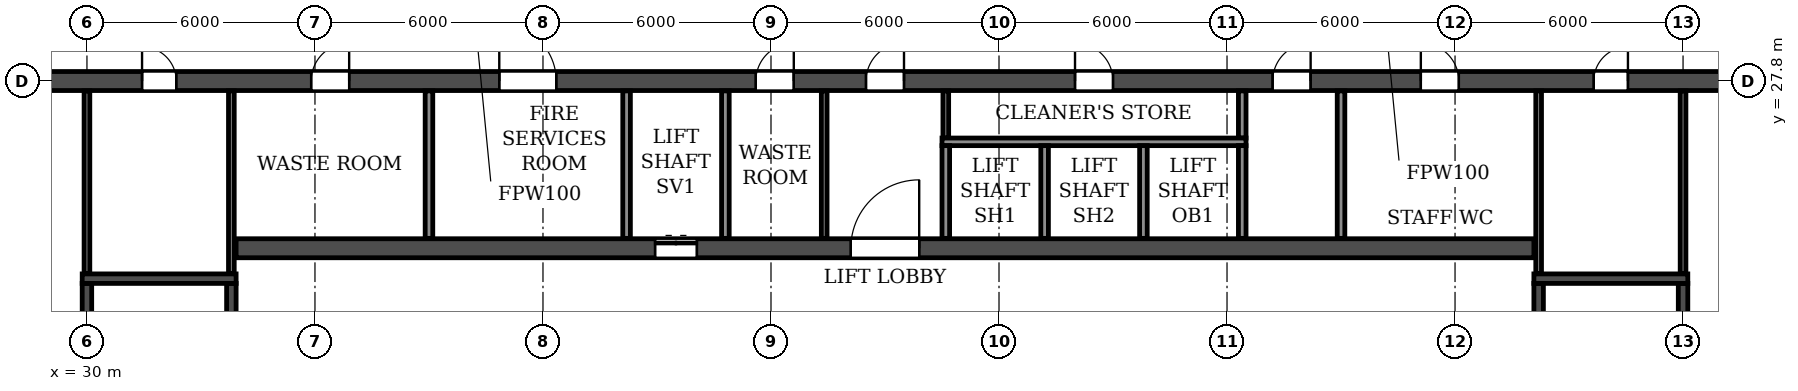
"""IFC4 building model, lengths in metres.
Left out: names, types, materials, properties, quantities, classifications, styles, units other than length and angle.
Written with IfcOpenShell. Run it as: python <this file> out.ifc"""

import sys

from ifc_helpers import new_model, si_unit, direction, frame, frame_2d, origin, place, context, subcontext, project, spatial, rectangle, extrude, element, fill, save


model = new_model("IFC4")
c1 = context("Model", 3, precision=1e-05, world=origin(), true_north=direction((0.0, 1.0)))
c2 = subcontext(c1, "Body", "Model", "MODEL_VIEW")
j1 = project(units=[si_unit("LENGTHUNIT", "METRE"), si_unit("PLANEANGLEUNIT", "RADIAN")], contexts=[c1])
p1 = place(None, origin())
s1 = spatial("IfcSite", under=j1, at=p1, CompositionType="ELEMENT")
p2 = place(p1, origin())
s2 = spatial("IfcBuilding", under=s1, at=p2, CompositionType="ELEMENT")
p3 = place(p2, frame((0.0, 0.0, 82.8)))
s3 = spatial("IfcBuildingStorey", under=s2, at=p3, CompositionType="ELEMENT", Elevation=82.8)
p4 = place(p3, frame((8.6, 27.8, 0.0), z_axis=(0.0, 0.0, 1.0), x_axis=(1.0, 0.0, 0.0)))
e1 = element("IfcWall", 1, at=p4, inside=s3, PredefinedType="SOLIDWALL", context=c2, shape_type="SweptSolid", body=[
    extrude(rectangle(XDim=84.8, YDim=0.5, at=frame_2d((42.4, 0.0))), origin(), (0.0, 0.0, 1.0), 3.06),
])
p5 = place(p4, frame((2.55, 0.0, 0.0)))
e2 = element("IfcOpeningElement", 2, at=p5, cuts=e1, PredefinedType="OPENING", context=c2, shape_type="SweptSolid", body=[
    extrude(rectangle(XDim=1.0, YDim=2.1, at=frame_2d((0.5, 1.05))), frame((0.0, 0.26, 0.0), z_axis=(0.0, -1.0, 0.0), x_axis=(1.0, 0.0, 0.0)), (0.0, 0.0, 1.0), 0.52),
])
p6 = place(p4, frame((7.25, 0.0, 0.0)))
e3 = element("IfcOpeningElement", 3, at=p6, cuts=e1, PredefinedType="OPENING", context=c2, shape_type="SweptSolid", body=[
    extrude(rectangle(XDim=1.0, YDim=2.1, at=frame_2d((0.5, 1.05))), frame((0.0, 0.26, 0.0), z_axis=(0.0, -1.0, 0.0), x_axis=(1.0, 0.0, 0.0)), (0.0, 0.0, 1.0), 0.52),
])
p7 = place(p4, frame((10.3, 0.0, 0.0)))
e4 = element("IfcOpeningElement", 4, at=p7, cuts=e1, PredefinedType="OPENING", context=c2, shape_type="SweptSolid", body=[
    extrude(rectangle(XDim=1.0, YDim=2.1, at=frame_2d((0.5, 1.05))), frame((0.0, 0.26, 0.0), z_axis=(0.0, -1.0, 0.0), x_axis=(1.0, 0.0, 0.0)), (0.0, 0.0, 1.0), 0.52),
])
p8 = place(p4, frame((13.65, 0.0, 0.0)))
e5 = element("IfcOpeningElement", 5, at=p8, cuts=e1, PredefinedType="OPENING", context=c2, shape_type="SweptSolid", body=[
    extrude(rectangle(XDim=0.9, YDim=2.1, at=frame_2d((0.45, 1.05))), frame((0.0, 0.26, 0.0), z_axis=(0.0, -1.0, 0.0), x_axis=(1.0, 0.0, 0.0)), (0.0, 0.0, 1.0), 0.52),
])
p9 = place(p4, frame((22.85, 0.0, 0.0)))
e6 = element("IfcOpeningElement", 6, at=p9, cuts=e1, PredefinedType="OPENING", context=c2, shape_type="SweptSolid", body=[
    extrude(rectangle(XDim=0.9, YDim=2.1, at=frame_2d((0.45, 1.05))), frame((0.0, 0.26, 0.0), z_axis=(0.0, -1.0, 0.0), x_axis=(1.0, 0.0, 0.0)), (0.0, 0.0, 1.0), 0.52),
])
p10 = place(p4, frame((27.3, 0.0, 0.0)))
e7 = element("IfcOpeningElement", 7, at=p10, cuts=e1, PredefinedType="OPENING", context=c2, shape_type="SweptSolid", body=[
    extrude(rectangle(XDim=1.0, YDim=2.1, at=frame_2d((0.5, 1.05))), frame((0.0, 0.26, 0.0), z_axis=(0.0, -1.0, 0.0), x_axis=(1.0, 0.0, 0.0)), (0.0, 0.0, 1.0), 0.52),
])
p11 = place(p4, frame((32.25, 0.0, 0.0)))
e8 = element("IfcOpeningElement", 8, at=p11, cuts=e1, PredefinedType="OPENING", context=c2, shape_type="SweptSolid", body=[
    extrude(rectangle(XDim=1.5, YDim=2.1, at=frame_2d((0.75, 1.05))), frame((0.0, 0.26, 0.0), z_axis=(0.0, -1.0, 0.0), x_axis=(1.0, 0.0, 0.0)), (0.0, 0.0, 1.0), 0.52),
])
p12 = place(p4, frame((39.0, 0.0, 0.0)))
e9 = element("IfcOpeningElement", 9, at=p12, cuts=e1, PredefinedType="OPENING", context=c2, shape_type="SweptSolid", body=[
    extrude(rectangle(XDim=1.0, YDim=2.1, at=frame_2d((0.5, 1.05))), frame((0.0, 0.26, 0.0), z_axis=(0.0, -1.0, 0.0), x_axis=(1.0, 0.0, 0.0)), (0.0, 0.0, 1.0), 0.52),
])
p13 = place(p4, frame((41.9, 0.0, 0.0)))
e10 = element("IfcOpeningElement", 10, at=p13, cuts=e1, PredefinedType="OPENING", context=c2, shape_type="SweptSolid", body=[
    extrude(rectangle(XDim=1.0, YDim=2.1, at=frame_2d((0.5, 1.05))), frame((0.0, 0.26, 0.0), z_axis=(0.0, -1.0, 0.0), x_axis=(1.0, 0.0, 0.0)), (0.0, 0.0, 1.0), 0.52),
])
p14 = place(p4, frame((47.4, 0.0, 0.0)))
e11 = element("IfcOpeningElement", 11, at=p14, cuts=e1, PredefinedType="OPENING", context=c2, shape_type="SweptSolid", body=[
    extrude(rectangle(XDim=1.0, YDim=2.1, at=frame_2d((0.5, 1.05))), frame((0.0, 0.26, 0.0), z_axis=(0.0, -1.0, 0.0), x_axis=(1.0, 0.0, 0.0)), (0.0, 0.0, 1.0), 0.52),
])
p15 = place(p4, frame((52.6, 0.0, 0.0)))
e12 = element("IfcOpeningElement", 12, at=p15, cuts=e1, PredefinedType="OPENING", context=c2, shape_type="SweptSolid", body=[
    extrude(rectangle(XDim=1.0, YDim=2.1, at=frame_2d((0.5, 1.05))), frame((0.0, 0.26, 0.0), z_axis=(0.0, -1.0, 0.0), x_axis=(1.0, 0.0, 0.0)), (0.0, 0.0, 1.0), 0.52),
])
p16 = place(p4, frame((56.5, 0.0, 0.0)))
e13 = element("IfcOpeningElement", 13, at=p16, cuts=e1, PredefinedType="OPENING", context=c2, shape_type="SweptSolid", body=[
    extrude(rectangle(XDim=1.0, YDim=2.1, at=frame_2d((0.5, 1.05))), frame((0.0, 0.26, 0.0), z_axis=(0.0, -1.0, 0.0), x_axis=(1.0, 0.0, 0.0)), (0.0, 0.0, 1.0), 0.52),
])
p17 = place(p4, frame((61.05, 0.0, 0.0)))
e14 = element("IfcOpeningElement", 14, at=p17, cuts=e1, PredefinedType="OPENING", context=c2, shape_type="SweptSolid", body=[
    extrude(rectangle(XDim=0.9, YDim=2.1, at=frame_2d((0.45, 1.05))), frame((0.0, 0.26, 0.0), z_axis=(0.0, -1.0, 0.0), x_axis=(1.0, 0.0, 0.0)), (0.0, 0.0, 1.0), 0.52),
])
p18 = place(p4, frame((70.25, 0.0, 0.0)))
e15 = element("IfcOpeningElement", 15, at=p18, cuts=e1, PredefinedType="OPENING", context=c2, shape_type="SweptSolid", body=[
    extrude(rectangle(XDim=0.9, YDim=2.1, at=frame_2d((0.45, 1.05))), frame((0.0, 0.26, 0.0), z_axis=(0.0, -1.0, 0.0), x_axis=(1.0, 0.0, 0.0)), (0.0, 0.0, 1.0), 0.52),
])
p19 = place(p4, frame((73.5, 0.0, 0.0)))
e16 = element("IfcOpeningElement", 16, at=p19, cuts=e1, PredefinedType="OPENING", context=c2, shape_type="SweptSolid", body=[
    extrude(rectangle(XDim=1.0, YDim=2.1, at=frame_2d((0.5, 1.05))), frame((0.0, 0.26, 0.0), z_axis=(0.0, -1.0, 0.0), x_axis=(1.0, 0.0, 0.0)), (0.0, 0.0, 1.0), 0.52),
])
p20 = place(p4, frame((76.55, 0.0, 0.0)))
e17 = element("IfcOpeningElement", 17, at=p20, cuts=e1, PredefinedType="OPENING", context=c2, shape_type="SweptSolid", body=[
    extrude(rectangle(XDim=1.0, YDim=2.1, at=frame_2d((0.5, 1.05))), frame((0.0, 0.26, 0.0), z_axis=(0.0, -1.0, 0.0), x_axis=(1.0, 0.0, 0.0)), (0.0, 0.0, 1.0), 0.52),
])
p21 = place(p4, frame((81.25, 0.0, 0.0)))
e18 = element("IfcOpeningElement", 18, at=p21, cuts=e1, PredefinedType="OPENING", context=c2, shape_type="SweptSolid", body=[
    extrude(rectangle(XDim=1.0, YDim=2.1, at=frame_2d((0.5, 1.05))), frame((0.0, 0.26, 0.0), z_axis=(0.0, -1.0, 0.0), x_axis=(1.0, 0.0, 0.0)), (0.0, 0.0, 1.0), 0.52),
])
p22 = place(p3, frame((33.925, 23.4, 0.0), z_axis=(0.0, 0.0, 1.0), x_axis=(1.0, 0.0, 0.0)))
e19 = element("IfcWall", 19, at=p22, inside=s3, PredefinedType="SOLIDWALL", context=c2, shape_type="SweptSolid", body=[
    extrude(rectangle(XDim=34.15, YDim=0.5, at=frame_2d((17.075, 0.0))), origin(), (0.0, 0.0, 1.0), 3.06),
])
p23 = place(p22, frame((16.175, 0.0, 0.0)))
e20 = element("IfcOpeningElement", 20, at=p23, cuts=e19, PredefinedType="OPENING", context=c2, shape_type="SweptSolid", body=[
    extrude(rectangle(XDim=1.8, YDim=2.1, at=frame_2d((0.9, 1.05))), frame((0.0, 0.26, 0.0), z_axis=(0.0, -1.0, 0.0), x_axis=(1.0, 0.0, 0.0)), (0.0, 0.0, 1.0), 0.52),
])
p24 = place(p22, frame((11.025, 0.0, 0.0)))
e21 = element("IfcOpeningElement", 21, at=p24, cuts=e19, PredefinedType="OPENING", context=c2, shape_type="SweptSolid", body=[
    extrude(rectangle(XDim=1.1, YDim=2.1, at=frame_2d((0.55, 1.05))), frame((0.0, 0.26, 0.0), z_axis=(0.0, -1.0, 0.0), x_axis=(1.0, 0.0, 0.0)), (0.0, 0.0, 1.0), 0.52),
])
p25 = place(p3, frame((30.0, 14.85, 0.0), z_axis=(0.0, 0.0, 1.0), x_axis=(0.0, 1.0, 0.0)))
e22 = element("IfcWall", 22, at=p25, inside=s3, PredefinedType="SOLIDWALL", context=c2, shape_type="SweptSolid", body=[
    extrude(rectangle(XDim=7.625, YDim=0.25, at=frame_2d((3.812, 0.0))), origin(), (0.0, 0.0, 1.0), 3.06),
])
p26 = place(p3, frame((33.8, 14.85, 0.0), z_axis=(0.0, 0.0, 1.0), x_axis=(0.0, 1.0, 0.0)))
e23 = element("IfcWall", 23, at=p26, inside=s3, PredefinedType="SOLIDWALL", context=c2, shape_type="SweptSolid", body=[
    extrude(rectangle(XDim=7.625, YDim=0.25, at=frame_2d((3.812, 0.0))), origin(), (0.0, 0.0, 1.0), 3.06),
])
p27 = place(p26, frame((0.45, 0.0, 0.0)))
e24 = element("IfcOpeningElement", 24, at=p27, cuts=e23, PredefinedType="OPENING", context=c2, shape_type="SweptSolid", body=[
    extrude(rectangle(XDim=1.0, YDim=2.1, at=frame_2d((0.5, 1.05))), frame((0.0, 0.135, 0.0), z_axis=(0.0, -1.0, 0.0), x_axis=(1.0, 0.0, 0.0)), (0.0, 0.0, 1.0), 0.27),
])
p28 = place(p3, frame((29.875, 22.6, 0.0), z_axis=(0.0, 0.0, 1.0), x_axis=(1.0, 0.0, 0.0)))
e25 = element("IfcWall", 25, at=p28, inside=s3, PredefinedType="SOLIDWALL", context=c2, shape_type="SweptSolid", body=[
    extrude(rectangle(XDim=4.05, YDim=0.25, at=frame_2d((2.025, 0.0))), origin(), (0.0, 0.0, 1.0), 3.06),
])
p29 = place(p3, frame((68.2, 14.85, 0.0), z_axis=(0.0, 0.0, 1.0), x_axis=(0.0, 1.0, 0.0)))
e26 = element("IfcWall", 26, at=p29, inside=s3, PredefinedType="SOLIDWALL", context=c2, shape_type="SweptSolid", body=[
    extrude(rectangle(XDim=7.625, YDim=0.25, at=frame_2d((3.812, 0.0))), origin(), (0.0, 0.0, 1.0), 3.06),
])
p30 = place(p29, frame((0.45, 0.0, 0.0)))
e27 = element("IfcOpeningElement", 27, at=p30, cuts=e26, PredefinedType="OPENING", context=c2, shape_type="SweptSolid", body=[
    extrude(rectangle(XDim=1.0, YDim=2.1, at=frame_2d((0.5, 1.05))), frame((0.0, 0.135, 0.0), z_axis=(0.0, -1.0, 0.0), x_axis=(1.0, 0.0, 0.0)), (0.0, 0.0, 1.0), 0.27),
])
p31 = place(p3, frame((72.0, 14.85, 0.0), z_axis=(0.0, 0.0, 1.0), x_axis=(0.0, 1.0, 0.0)))
e28 = element("IfcWall", 28, at=p31, inside=s3, PredefinedType="SOLIDWALL", context=c2, shape_type="SweptSolid", body=[
    extrude(rectangle(XDim=7.625, YDim=0.25, at=frame_2d((3.812, 0.0))), origin(), (0.0, 0.0, 1.0), 3.06),
])
p32 = place(p3, frame((68.075, 22.6, 0.0), z_axis=(0.0, 0.0, 1.0), x_axis=(1.0, 0.0, 0.0)))
e29 = element("IfcWall", 29, at=p32, inside=s3, PredefinedType="SOLIDWALL", context=c2, shape_type="SweptSolid", body=[
    extrude(rectangle(XDim=4.05, YDim=0.25, at=frame_2d((2.025, 0.0))), origin(), (0.0, 0.0, 1.0), 3.06),
])
p33 = place(p3, frame((49.4, 23.66, 0.0), z_axis=(0.0, 0.0, 1.0), x_axis=(0.0, 1.0, 0.0)))
e30 = element("IfcWall", 30, at=p33, inside=s3, PredefinedType="PARTITIONING", context=c2, shape_type="SweptSolid", body=[
    extrude(rectangle(XDim=3.88, YDim=0.15, at=frame_2d((1.94, 0.0))), origin(), (0.0, 0.0, 1.0), 3.06),
])
p34 = place(p3, frame((52.6, 26.3, 0.0), z_axis=(0.0, 0.0, 1.0), x_axis=(0.0, 1.0, 0.0)))
e31 = element("IfcWall", 31, at=p34, inside=s3, PredefinedType="PARTITIONING", context=c2, shape_type="SweptSolid", body=[
    extrude(rectangle(XDim=1.24, YDim=0.15, at=frame_2d((0.62, 0.0))), origin(), (0.0, 0.0, 1.0), 3.06),
])
p35 = place(p3, frame((39.0, 23.66, 0.0), z_axis=(0.0, 0.0, 1.0), x_axis=(0.0, 1.0, 0.0)))
e32 = element("IfcWall", 32, at=p35, inside=s3, PredefinedType="PARTITIONING", context=c2, shape_type="SweptSolid", body=[
    extrude(rectangle(XDim=3.88, YDim=0.2, at=frame_2d((1.94, 0.0))), origin(), (0.0, 0.0, 1.0), 3.06),
])
p36 = place(p3, frame((60.4, 26.3, 0.0), z_axis=(0.0, 0.0, 1.0), x_axis=(0.0, 1.0, 0.0)))
e33 = element("IfcWall", 33, at=p36, inside=s3, PredefinedType="PARTITIONING", context=c2, shape_type="SweptSolid", body=[
    extrude(rectangle(XDim=1.24, YDim=0.2, at=frame_2d((0.62, 0.0))), origin(), (0.0, 0.0, 1.0), 3.06),
])
p37 = place(p3, frame((63.0, 23.66, 0.0), z_axis=(0.0, 0.0, 1.0), x_axis=(0.0, 1.0, 0.0)))
e34 = element("IfcWall", 34, at=p37, inside=s3, PredefinedType="PARTITIONING", context=c2, shape_type="SweptSolid", body=[
    extrude(rectangle(XDim=3.88, YDim=0.2, at=frame_2d((1.94, 0.0))), origin(), (0.0, 0.0, 1.0), 3.06),
])
for number, where, z_axis, x_axis in (
    (35, (30.0, 22.735, 0.0), (0.0, 0.0, 1.0), (0.0, 1.0, 0.0)),
    (36, (33.8, 22.735, 0.0), (0.0, 0.0, 1.0), (0.0, 1.0, 0.0)),
    (37, (68.2, 22.735, 0.0), (0.0, 0.0, 1.0), (0.0, 1.0, 0.0)),
    (38, (72.0, 22.735, 0.0), (0.0, 0.0, 1.0), (0.0, 1.0, 0.0)),
):
    element("IfcWall", number, at=place(p3, frame(where, z_axis=z_axis, x_axis=x_axis)), inside=s3, PredefinedType="PARTITIONING", context=c2, shape_type="SweptSolid", body=[
        extrude(rectangle(XDim=4.805, YDim=0.15, at=frame_2d((2.402, 0.0))), origin(), (0.0, 0.0, 1.0), 3.06),
    ])
p38 = place(p3, frame((52.5, 26.2, 0.0), z_axis=(0.0, 0.0, 1.0), x_axis=(1.0, 0.0, 0.0)))
e39 = element("IfcWall", 39, at=p38, inside=s3, PredefinedType="PARTITIONING", context=c2, shape_type="SweptSolid", body=[
    extrude(rectangle(XDim=8.0, YDim=0.2, at=frame_2d((4.0, 0.0))), origin(), (0.0, 0.0, 1.0), 3.06),
])
for number, where, z_axis, x_axis in (
    (40, (44.2, 23.66, 0.0), (0.0, 0.0, 1.0), (0.0, 1.0, 0.0)),
    (41, (46.8, 23.66, 0.0), (0.0, 0.0, 1.0), (0.0, 1.0, 0.0)),
):
    element("IfcWall", number, at=place(p3, frame(where, z_axis=z_axis, x_axis=x_axis)), inside=s3, PredefinedType="PARTITIONING", context=c2, shape_type="SweptSolid", body=[
        extrude(rectangle(XDim=3.88, YDim=0.2, at=frame_2d((1.94, 0.0))), origin(), (0.0, 0.0, 1.0), 3.06),
    ])
for number, where, z_axis, x_axis in (
    (42, (52.6, 23.66, 0.0), (0.0, 0.0, 1.0), (0.0, 1.0, 0.0)),
    (43, (55.2, 23.66, 0.0), (0.0, 0.0, 1.0), (0.0, 1.0, 0.0)),
    (44, (57.8, 23.66, 0.0), (0.0, 0.0, 1.0), (0.0, 1.0, 0.0)),
    (45, (60.4, 23.66, 0.0), (0.0, 0.0, 1.0), (0.0, 1.0, 0.0)),
):
    element("IfcWall", number, at=place(p3, frame(where, z_axis=z_axis, x_axis=x_axis)), inside=s3, PredefinedType="PARTITIONING", context=c2, shape_type="SweptSolid", body=[
        extrude(rectangle(XDim=2.44, YDim=0.2, at=frame_2d((1.22, 0.0))), origin(), (0.0, 0.0, 1.0), 3.06),
    ])
p39 = place(p9, origin())
e46 = element("IfcDoor", 46, at=p39, inside=s3, OperationType="SINGLE_SWING_LEFT", PredefinedType="DOOR", context=c2, shape_type="SweptSolid", body=[
    extrude(rectangle(XDim=0.9, YDim=2.1, at=frame_2d((0.45, 1.05))), frame((0.0, 0.025, 0.0), z_axis=(0.0, -1.0, 0.0), x_axis=(1.0, 0.0, 0.0)), (0.0, 0.0, 1.0), 0.05),
])
fill(e6, e46)
p40 = place(p10, origin())
e47 = element("IfcDoor", 47, at=p40, inside=s3, OperationType="SINGLE_SWING_RIGHT", PredefinedType="DOOR", context=c2, shape_type="SweptSolid", body=[
    extrude(rectangle(XDim=1.0, YDim=2.1, at=frame_2d((0.5, 1.05))), frame((0.0, 0.025, 0.0), z_axis=(0.0, -1.0, 0.0), x_axis=(1.0, 0.0, 0.0)), (0.0, 0.0, 1.0), 0.05),
])
fill(e7, e47)
p41 = place(p11, origin())
e48 = element("IfcDoor", 48, at=p41, inside=s3, OperationType="DOUBLE_DOOR_SINGLE_SWING", PredefinedType="DOOR", context=c2, shape_type="SweptSolid", body=[
    extrude(rectangle(XDim=1.5, YDim=2.1, at=frame_2d((0.75, 1.05))), frame((0.0, 0.025, 0.0), z_axis=(0.0, -1.0, 0.0), x_axis=(1.0, 0.0, 0.0)), (0.0, 0.0, 1.0), 0.05),
])
fill(e8, e48)
p42 = place(p12, origin())
e49 = element("IfcDoor", 49, at=p42, inside=s3, OperationType="SINGLE_SWING_RIGHT", PredefinedType="DOOR", context=c2, shape_type="SweptSolid", body=[
    extrude(rectangle(XDim=1.0, YDim=2.1, at=frame_2d((0.5, 1.05))), frame((0.0, 0.025, 0.0), z_axis=(0.0, -1.0, 0.0), x_axis=(1.0, 0.0, 0.0)), (0.0, 0.0, 1.0), 0.05),
])
fill(e9, e49)
p43 = place(p13, origin())
e50 = element("IfcDoor", 50, at=p43, inside=s3, OperationType="SINGLE_SWING_RIGHT", PredefinedType="DOOR", context=c2, shape_type="SweptSolid", body=[
    extrude(rectangle(XDim=1.0, YDim=2.1, at=frame_2d((0.5, 1.05))), frame((0.0, 0.025, 0.0), z_axis=(0.0, -1.0, 0.0), x_axis=(1.0, 0.0, 0.0)), (0.0, 0.0, 1.0), 0.05),
])
fill(e10, e50)
p44 = place(p14, origin())
e51 = element("IfcDoor", 51, at=p44, inside=s3, OperationType="SINGLE_SWING_LEFT", PredefinedType="DOOR", context=c2, shape_type="SweptSolid", body=[
    extrude(rectangle(XDim=1.0, YDim=2.1, at=frame_2d((0.5, 1.05))), frame((0.0, 0.025, 0.0), z_axis=(0.0, -1.0, 0.0), x_axis=(1.0, 0.0, 0.0)), (0.0, 0.0, 1.0), 0.05),
])
fill(e11, e51)
p45 = place(p15, origin())
e52 = element("IfcDoor", 52, at=p45, inside=s3, OperationType="SINGLE_SWING_RIGHT", PredefinedType="DOOR", context=c2, shape_type="SweptSolid", body=[
    extrude(rectangle(XDim=1.0, YDim=2.1, at=frame_2d((0.5, 1.05))), frame((0.0, 0.025, 0.0), z_axis=(0.0, -1.0, 0.0), x_axis=(1.0, 0.0, 0.0)), (0.0, 0.0, 1.0), 0.05),
])
fill(e12, e52)
p46 = place(p16, origin())
e53 = element("IfcDoor", 53, at=p46, inside=s3, OperationType="SINGLE_SWING_LEFT", PredefinedType="DOOR", context=c2, shape_type="SweptSolid", body=[
    extrude(rectangle(XDim=1.0, YDim=2.1, at=frame_2d((0.5, 1.05))), frame((0.0, 0.025, 0.0), z_axis=(0.0, -1.0, 0.0), x_axis=(1.0, 0.0, 0.0)), (0.0, 0.0, 1.0), 0.05),
])
fill(e13, e53)
p47 = place(p17, origin())
e54 = element("IfcDoor", 54, at=p47, inside=s3, OperationType="SINGLE_SWING_RIGHT", PredefinedType="DOOR", context=c2, shape_type="SweptSolid", body=[
    extrude(rectangle(XDim=0.9, YDim=2.1, at=frame_2d((0.45, 1.05))), frame((0.0, 0.025, 0.0), z_axis=(0.0, -1.0, 0.0), x_axis=(1.0, 0.0, 0.0)), (0.0, 0.0, 1.0), 0.05),
])
fill(e14, e54)
p48 = place(p23, origin())
e55 = element("IfcDoor", 55, at=p48, inside=s3, OperationType="DOUBLE_DOOR_SINGLE_SWING", PredefinedType="DOOR", context=c2, shape_type="SweptSolid", body=[
    extrude(rectangle(XDim=1.8, YDim=2.1, at=frame_2d((0.9, 1.05))), frame((0.0, 0.025, 0.0), z_axis=(0.0, -1.0, 0.0), x_axis=(1.0, 0.0, 0.0)), (0.0, 0.0, 1.0), 0.05),
])
fill(e20, e55)
p49 = place(p24, origin())
e56 = element("IfcDoor", 56, at=p49, inside=s3, OperationType="DOUBLE_DOOR_SLIDING", PredefinedType="DOOR", context=c2, shape_type="SweptSolid", body=[
    extrude(rectangle(XDim=1.1, YDim=2.1, at=frame_2d((0.55, 1.05))), frame((0.0, 0.025, 0.0), z_axis=(0.0, -1.0, 0.0), x_axis=(1.0, 0.0, 0.0)), (0.0, 0.0, 1.0), 0.05),
])
fill(e21, e56)
save(model, sys.argv[1])
